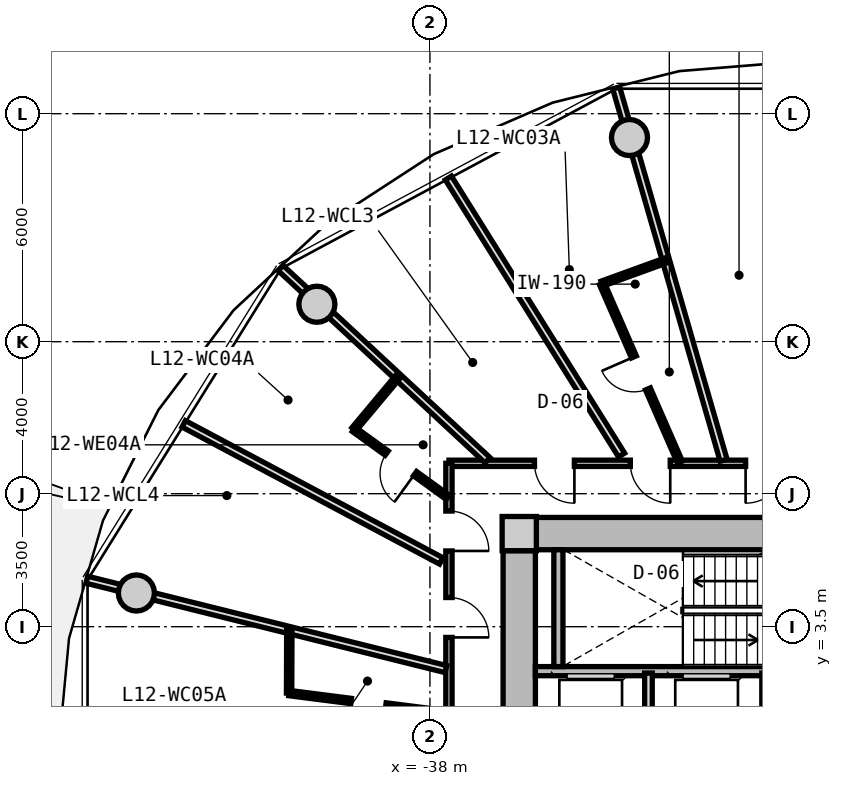
"""IFC4 building model, lengths in metres.
Left out: names, types, materials, properties, quantities, classifications, styles, units other than length and angle.
Written with IfcOpenShell. Run it as: python <this file> out.ifc"""

import sys

from ifc_helpers import new_model, si_unit, direction, frame, frame_2d, origin, origin_2d, place, context, subcontext, project, spatial, rectangle, circle, extrude, source, transform, mapped, element, fill, save


model = new_model("IFC4")
c1 = context("Model", 3, precision=1e-05, world=origin(), true_north=direction((0.0, 1.0)))
c2 = subcontext(c1, "Body", "Model", "MODEL_VIEW")
j1 = project(units=[si_unit("LENGTHUNIT", "METRE"), si_unit("PLANEANGLEUNIT", "RADIAN")], contexts=[c1])
p1 = place(None, origin())
s1 = spatial("IfcSite", under=j1, at=p1, CompositionType="ELEMENT")
p2 = place(p1, origin())
s2 = spatial("IfcBuilding", under=s1, at=p2, CompositionType="ELEMENT")
p3 = place(p2, frame((0.0, 0.0, 42.95)))
s3 = spatial("IfcBuildingStorey", under=s2, at=p3, CompositionType="ELEMENT", Elevation=42.95)
m1 = source(origin(), c2, "Body", "SweptSolid", [
    extrude(rectangle(XDim=0.9, YDim=0.9, at=origin_2d()), origin(), (0.0, 0.0, 1.0), 3.05),
])
p4 = place(p3, frame((-35.65, 5.95, 0.0), z_axis=(0.0, 0.0, 1.0), x_axis=(1.0, 0.0, 0.0)))
e1 = element("IfcColumn", 1, at=p4, inside=s3, PredefinedType="COLUMN", context=c2, shape_type="MappedRepresentation", body=[
    mapped(m1, transform((0.0, 0.0, 0.0), x_axis=(1.0, 0.0, 0.0), y_axis=(0.0, 1.0, 0.0), z_axis=(0.0, 0.0, 1.0), scale=1.0)),
])
m2 = source(origin(), c2, "Body", "SweptSolid", [
    extrude(rectangle(XDim=14.4, YDim=0.85, at=frame_2d((7.2, 0.0))), origin(), (0.0, 0.0, 1.0), 2.79),
])
p5 = place(p3, frame((-35.2, 5.95, 0.0), z_axis=(0.0, 0.0, 1.0), x_axis=(1.0, 0.0, 0.0)))
e2 = element("IfcWall", 2, at=p5, inside=s3, PredefinedType="SHEAR", context=c2, shape_type="MappedRepresentation", body=[
    mapped(m2, transform((0.0, 0.0, 0.0), x_axis=(1.0, 0.0, 0.0), y_axis=(0.0, 1.0, 0.0), z_axis=(0.0, 0.0, 1.0), scale=1.0)),
])
m3 = source(origin(), c2, "Body", "SweptSolid", [
    extrude(rectangle(XDim=11.0, YDim=0.85, at=frame_2d((5.5, 0.0))), origin(), (0.0, 0.0, 1.0), 2.79),
])
p6 = place(p3, frame((-35.65, -5.5, 0.0), z_axis=(0.0, 0.0, 1.0), x_axis=(0.0, 1.0, 0.0)))
e3 = element("IfcWall", 3, at=p6, inside=s3, PredefinedType="SHEAR", context=c2, shape_type="MappedRepresentation", body=[
    mapped(m3, transform((0.0, 0.0, 0.0), x_axis=(1.0, 0.0, 0.0), y_axis=(0.0, 1.0, 0.0), z_axis=(0.0, 0.0, 1.0), scale=1.0)),
])
p7 = place(p6, frame((3.8, 0.0, 0.0)))
e4 = element("IfcOpeningElement", 4, at=p7, cuts=e3, PredefinedType="OPENING", context=c2, shape_type="SweptSolid", body=[
    extrude(rectangle(XDim=1.2, YDim=2.15, at=frame_2d((0.6, 1.075))), frame((0.0, 0.435, 0.0), z_axis=(0.0, -1.0, 0.0), x_axis=(1.0, 0.0, 0.0)), (0.0, 0.0, 1.0), 0.87),
])
m4 = source(origin(), c2, "Body", "SweptSolid", [
    extrude(circle(Radius=0.475, at=origin_2d()), origin(), (0.0, 0.0, 1.0), 3.05),
])
for number, where, z_axis, x_axis in (
    (5, (-32.749, 16.373, 0.0), (0.0, 0.0, 1.0), (1.0, 0.0, 0.0)),
    (6, (-40.975, 11.985, 0.0), (0.0, 0.0, 1.0), (1.0, 0.0, 0.0)),
    (7, (-45.725, 4.387, 0.0), (0.0, 0.0, 1.0), (1.0, 0.0, 0.0)),
):
    element("IfcColumn", number, at=place(p3, frame(where, z_axis=z_axis, x_axis=x_axis)), inside=s3, PredefinedType="COLUMN", context=c2, shape_type="MappedRepresentation", body=[
        mapped(m4, transform((0.0, 0.0, 0.0), x_axis=(1.0, 0.0, 0.0), y_axis=(0.0, 1.0, 0.0), z_axis=(0.0, 0.0, 1.0), scale=1.0)),
    ])
m5 = source(origin(), c2, "Body", "SweptSolid", [
    extrude(rectangle(XDim=7.765, YDim=0.24, at=frame_2d((3.883, 0.0))), origin(), (0.0, 0.0, 1.0), 2.79),
])
p8 = place(p3, frame((-35.225, 2.33, 0.0), z_axis=(0.0, 0.0, 1.0), x_axis=(1.0, 0.0, 0.0)))
e8 = element("IfcWall", 8, at=p8, inside=s3, PredefinedType="PARTITIONING", context=c2, shape_type="MappedRepresentation", body=[
    mapped(m5, transform((0.0, 0.0, 0.0), x_axis=(1.0, 0.0, 0.0), y_axis=(0.0, 1.0, 0.0), z_axis=(0.0, 0.0, 1.0), scale=1.0)),
])
m6 = source(origin(), c2, "Body", "SweptSolid", [
    extrude(rectangle(XDim=3.075, YDim=0.24, at=frame_2d((1.538, 0.0))), origin(), (0.0, 0.0, 1.0), 2.79),
])
p9 = place(p3, frame((-34.62, 2.45, 0.0), z_axis=(0.0, 0.0, 1.0), x_axis=(0.0, 1.0, 0.0)))
e9 = element("IfcWall", 9, at=p9, inside=s3, PredefinedType="PARTITIONING", context=c2, shape_type="MappedRepresentation", body=[
    mapped(m6, transform((0.0, 0.0, 0.0), x_axis=(1.0, 0.0, 0.0), y_axis=(0.0, 1.0, 0.0), z_axis=(0.0, 0.0, 1.0), scale=1.0)),
])
m7 = source(origin(), c2, "Body", "SweptSolid", [
    extrude(rectangle(XDim=2.33, YDim=0.2, at=frame_2d((1.165, 0.0))), origin(), (0.0, 0.0, 1.0), 2.775),
])
p10 = place(p3, frame((-32.25, -0.05, 0.0), z_axis=(0.0, 0.0, 1.0), x_axis=(0.0, 1.0, 0.0)))
e10 = element("IfcWall", 10, at=p10, inside=s3, PredefinedType="PARTITIONING", context=c2, shape_type="MappedRepresentation", body=[
    mapped(m7, transform((0.0, 0.0, 0.0), x_axis=(1.0, 0.0, 0.0), y_axis=(0.0, 1.0, 0.0), z_axis=(0.0, 0.0, 1.0), scale=1.0)),
])
m8 = source(origin(), c2, "Body", "SweptSolid", [
    extrude(rectangle(XDim=19.0, YDim=0.165, at=frame_2d((9.5, 0.0))), origin(), (0.0, 0.0, 1.0), 2.775),
])
p11 = place(p3, frame((-37.5, 7.8, 0.0), z_axis=(0.0, 0.0, 1.0), x_axis=(1.0, 0.0, 0.0)))
e11 = element("IfcWall", 11, at=p11, inside=s3, PredefinedType="PARTITIONING", context=c2, shape_type="MappedRepresentation", body=[
    mapped(m8, transform((0.0, 0.0, 0.0), x_axis=(1.0, 0.0, 0.0), y_axis=(0.0, 1.0, 0.0), z_axis=(0.0, 0.0, 1.0), scale=1.0)),
])
p12 = place(p11, frame((4.773, 0.0, 0.0)))
e12 = element("IfcOpeningElement", 12, at=p12, cuts=e11, PredefinedType="OPENING", context=c2, shape_type="SweptSolid", body=[
    extrude(rectangle(XDim=1.05, YDim=2.15, at=frame_2d((0.525, 1.075))), frame((0.0, 0.093, 0.0), z_axis=(0.0, -1.0, 0.0), x_axis=(1.0, 0.0, 0.0)), (0.0, 0.0, 1.0), 0.185),
])
p13 = place(p11, frame((2.251, 0.0, 0.0)))
e13 = element("IfcOpeningElement", 13, at=p13, cuts=e11, PredefinedType="OPENING", context=c2, shape_type="SweptSolid", body=[
    extrude(rectangle(XDim=1.05, YDim=2.15, at=frame_2d((0.525, 1.075))), frame((0.0, 0.093, 0.0), z_axis=(0.0, -1.0, 0.0), x_axis=(1.0, 0.0, 0.0)), (0.0, 0.0, 1.0), 0.185),
])
p14 = place(p11, frame((14.653, 0.0, 0.0)))
e14 = element("IfcOpeningElement", 14, at=p14, cuts=e11, PredefinedType="OPENING", context=c2, shape_type="SweptSolid", body=[
    extrude(rectangle(XDim=1.05, YDim=2.15, at=frame_2d((0.525, 1.075))), frame((0.0, 0.093, 0.0), z_axis=(0.0, -1.0, 0.0), x_axis=(1.0, 0.0, 0.0)), (0.0, 0.0, 1.0), 0.185),
])
p15 = place(p11, frame((12.5, 0.0, 0.0)))
e15 = element("IfcOpeningElement", 15, at=p15, cuts=e11, PredefinedType="OPENING", context=c2, shape_type="SweptSolid", body=[
    extrude(rectangle(XDim=1.05, YDim=2.15, at=frame_2d((0.525, 1.075))), frame((0.0, 0.093, 0.0), z_axis=(0.0, -1.0, 0.0), x_axis=(1.0, 0.0, 0.0)), (0.0, 0.0, 1.0), 0.185),
])
p16 = place(p11, frame((9.352, 0.0, 0.0)))
e16 = element("IfcOpeningElement", 16, at=p16, cuts=e11, PredefinedType="OPENING", context=c2, shape_type="SweptSolid", body=[
    extrude(rectangle(XDim=1.05, YDim=2.15, at=frame_2d((0.525, 1.075))), frame((0.0, 0.093, 0.0), z_axis=(0.0, -1.0, 0.0), x_axis=(1.0, 0.0, 0.0)), (0.0, 0.0, 1.0), 0.185),
])
p17 = place(p11, frame((7.806, 0.0, 0.0)))
e17 = element("IfcOpeningElement", 17, at=p17, cuts=e11, PredefinedType="OPENING", context=c2, shape_type="SweptSolid", body=[
    extrude(rectangle(XDim=1.05, YDim=2.15, at=frame_2d((0.525, 1.075))), frame((0.0, 0.093, 0.0), z_axis=(0.0, -1.0, 0.0), x_axis=(1.0, 0.0, 0.0)), (0.0, 0.0, 1.0), 0.185),
])
m9 = source(origin(), c2, "Body", "SweptSolid", [
    extrude(rectangle(XDim=15.6, YDim=0.165, at=frame_2d((7.8, 0.0))), origin(), (0.0, 0.0, 1.0), 2.775),
])
p18 = place(p3, frame((-37.5, -7.8, 0.0), z_axis=(0.0, 0.0, 1.0), x_axis=(0.0, 1.0, 0.0)))
e18 = element("IfcWall", 18, at=p18, inside=s3, PredefinedType="PARTITIONING", context=c2, shape_type="MappedRepresentation", body=[
    mapped(m9, transform((0.0, 0.0, 0.0), x_axis=(1.0, 0.0, 0.0), y_axis=(0.0, 1.0, 0.0), z_axis=(0.0, 0.0, 1.0), scale=1.0)),
])
p19 = place(p18, frame((13.293, 0.0, 0.0)))
e19 = element("IfcOpeningElement", 19, at=p19, cuts=e18, PredefinedType="OPENING", context=c2, shape_type="SweptSolid", body=[
    extrude(rectangle(XDim=1.05, YDim=2.15, at=frame_2d((0.525, 1.075))), frame((0.0, 0.093, 0.0), z_axis=(0.0, -1.0, 0.0), x_axis=(1.0, 0.0, 0.0)), (0.0, 0.0, 1.0), 0.185),
])
p20 = place(p18, frame((11.018, 0.0, 0.0)))
e20 = element("IfcOpeningElement", 20, at=p20, cuts=e18, PredefinedType="OPENING", context=c2, shape_type="SweptSolid", body=[
    extrude(rectangle(XDim=1.05, YDim=2.15, at=frame_2d((0.525, 1.075))), frame((0.0, 0.093, 0.0), z_axis=(0.0, -1.0, 0.0), x_axis=(1.0, 0.0, 0.0)), (0.0, 0.0, 1.0), 0.185),
])
p21 = place(p18, frame((7.812, 0.0, 0.0)))
e21 = element("IfcOpeningElement", 21, at=p21, cuts=e18, PredefinedType="OPENING", context=c2, shape_type="SweptSolid", body=[
    extrude(rectangle(XDim=1.05, YDim=2.15, at=frame_2d((0.525, 1.075))), frame((0.0, 0.093, 0.0), z_axis=(0.0, -1.0, 0.0), x_axis=(1.0, 0.0, 0.0)), (0.0, 0.0, 1.0), 0.185),
])
p22 = place(p18, frame((6.035, 0.0, 0.0)))
e22 = element("IfcOpeningElement", 22, at=p22, cuts=e18, PredefinedType="OPENING", context=c2, shape_type="SweptSolid", body=[
    extrude(rectangle(XDim=1.05, YDim=2.15, at=frame_2d((0.525, 1.075))), frame((0.0, 0.093, 0.0), z_axis=(0.0, -1.0, 0.0), x_axis=(1.0, 0.0, 0.0)), (0.0, 0.0, 1.0), 0.185),
])
p23 = place(p18, frame((3.489, 0.0, 0.0)))
e23 = element("IfcOpeningElement", 23, at=p23, cuts=e18, PredefinedType="OPENING", context=c2, shape_type="SweptSolid", body=[
    extrude(rectangle(XDim=1.05, YDim=2.15, at=frame_2d((0.525, 1.075))), frame((0.0, 0.093, 0.0), z_axis=(0.0, -1.0, 0.0), x_axis=(1.0, 0.0, 0.0)), (0.0, 0.0, 1.0), 0.185),
])
p24 = place(p18, frame((0.882, 0.0, 0.0)))
e24 = element("IfcOpeningElement", 24, at=p24, cuts=e18, PredefinedType="OPENING", context=c2, shape_type="SweptSolid", body=[
    extrude(rectangle(XDim=1.05, YDim=2.15, at=frame_2d((0.525, 1.075))), frame((0.0, 0.093, 0.0), z_axis=(0.0, -1.0, 0.0), x_axis=(1.0, 0.0, 0.0)), (0.0, 0.0, 1.0), 0.185),
])
m10 = source(origin(), c2, "Body", "SweptSolid", [
    extrude(rectangle(XDim=10.196, YDim=0.19, at=frame_2d((5.098, 0.0))), origin(), (0.0, 0.0, 1.0), 2.225),
])
p25 = place(p3, frame((-30.273, 7.88, 0.0), z_axis=(0.0, 0.0, 1.0), x_axis=(-0.277136420347, 0.960830580549, 0.0)))
e25 = element("IfcWall", 25, at=p25, inside=s3, PredefinedType="PARTITIONING", context=c2, shape_type="MappedRepresentation", body=[
    mapped(m10, transform((0.0, 0.0, 0.0), x_axis=(1.0, 0.0, 0.0), y_axis=(0.0, 1.0, 0.0), z_axis=(0.0, 0.0, 1.0), scale=1.0)),
])
m11 = source(origin(), c2, "Body", "SweptSolid", [
    extrude(rectangle(XDim=7.435, YDim=0.19, at=frame_2d((3.717, 0.0))), origin(), (0.0, 0.0, 1.0), 2.225),
])
p26 = place(p3, frame((-36.483, 7.88, 0.0), z_axis=(0.0, 0.0, 1.0), x_axis=(-0.732651956848, 0.680603489652, 0.0)))
e26 = element("IfcWall", 26, at=p26, inside=s3, PredefinedType="PARTITIONING", context=c2, shape_type="MappedRepresentation", body=[
    mapped(m11, transform((0.0, 0.0, 0.0), x_axis=(1.0, 0.0, 0.0), y_axis=(0.0, 1.0, 0.0), z_axis=(0.0, 0.0, 1.0), scale=1.0)),
])
m12 = source(origin(), c2, "Body", "SweptSolid", [
    extrude(rectangle(XDim=8.598, YDim=0.19, at=frame_2d((4.299, 0.0))), origin(), (0.0, 0.0, 1.0), 2.775),
])
p27 = place(p3, frame((-32.957, 8.017, 0.0), z_axis=(0.0, 0.0, 1.0), x_axis=(-0.530039776395, 0.847972779893, 0.0)))
e27 = element("IfcWall", 27, at=p27, inside=s3, PredefinedType="PARTITIONING", context=c2, shape_type="MappedRepresentation", body=[
    mapped(m12, transform((0.0, 0.0, 0.0), x_axis=(1.0, 0.0, 0.0), y_axis=(0.0, 1.0, 0.0), z_axis=(0.0, 0.0, 1.0), scale=1.0)),
])
m13 = source(origin(), c2, "Body", "SweptSolid", [
    extrude(rectangle(XDim=5.126, YDim=0.14, at=frame_2d((2.563, 0.0))), origin(), (0.0, 0.0, 1.0), 2.775),
])
p28 = place(p3, frame((-31.422, 7.83, 0.0), z_axis=(0.0, 0.0, 1.0), x_axis=(-0.400473994842, 0.916308124735, 0.0)))
e28 = element("IfcWall", 28, at=p28, inside=s3, PredefinedType="PARTITIONING", context=c2, shape_type="MappedRepresentation", body=[
    mapped(m13, transform((0.0, 0.0, 0.0), x_axis=(1.0, 0.0, 0.0), y_axis=(0.0, 1.0, 0.0), z_axis=(0.0, 0.0, 1.0), scale=1.0)),
])
p29 = place(p28, frame((2.103, 0.0, 0.0)))
e29 = element("IfcOpeningElement", 29, at=p29, cuts=e28, PredefinedType="OPENING", context=c2, shape_type="SweptSolid", body=[
    extrude(rectangle(XDim=0.92, YDim=2.1, at=frame_2d((0.46, 1.05))), frame((0.0, 0.08, 0.0), z_axis=(0.0, -1.0, 0.0), x_axis=(1.0, 0.0, 0.0)), (0.0, 0.0, 1.0), 0.16),
])
m14 = source(origin(), c2, "Body", "SweptSolid", [
    extrude(rectangle(XDim=1.811, YDim=0.14, at=frame_2d((0.906, 0.0))), origin(), (0.0, 0.0, 1.0), 2.775),
])
p30 = place(p3, frame((-33.475, 12.527, 0.0), z_axis=(0.0, 0.0, 1.0), x_axis=(0.940009682452, 0.341147764021, 0.0)))
e30 = element("IfcWall", 30, at=p30, inside=s3, PredefinedType="PARTITIONING", context=c2, shape_type="MappedRepresentation", body=[
    mapped(m14, transform((0.0, 0.0, 0.0), x_axis=(1.0, 0.0, 0.0), y_axis=(0.0, 1.0, 0.0), z_axis=(0.0, 0.0, 1.0), scale=1.0)),
])
m15 = source(origin(), c2, "Body", "SweptSolid", [
    extrude(rectangle(XDim=9.737, YDim=0.19, at=frame_2d((4.869, 0.0))), origin(), (0.0, 0.0, 1.0), 2.225),
])
p31 = place(p3, frame((-37.58, 2.385, 0.0), z_axis=(0.0, 0.0, 1.0), x_axis=(-0.970392716238, 0.241532557375, 0.0)))
e31 = element("IfcWall", 31, at=p31, inside=s3, PredefinedType="PARTITIONING", context=c2, shape_type="MappedRepresentation", body=[
    mapped(m15, transform((0.0, 0.0, 0.0), x_axis=(1.0, 0.0, 0.0), y_axis=(0.0, 1.0, 0.0), z_axis=(0.0, 0.0, 1.0), scale=1.0)),
])
m16 = source(origin(), c2, "Body", "SweptSolid", [
    extrude(rectangle(XDim=7.677, YDim=0.19, at=frame_2d((3.838, 0.0))), origin(), (0.0, 0.0, 1.0), 2.775),
])
p32 = place(p3, frame((-37.703, 5.231, 0.0), z_axis=(0.0, 0.0, 1.0), x_axis=(-0.882725057546, 0.469889851753, 0.0)))
e32 = element("IfcWall", 32, at=p32, inside=s3, PredefinedType="PARTITIONING", context=c2, shape_type="MappedRepresentation", body=[
    mapped(m16, transform((0.0, 0.0, 0.0), x_axis=(1.0, 0.0, 0.0), y_axis=(0.0, 1.0, 0.0), z_axis=(0.0, 0.0, 1.0), scale=1.0)),
])
m17 = source(origin(), c2, "Body", "SweptSolid", [
    extrude(rectangle(XDim=3.051, YDim=0.14, at=frame_2d((1.525, 0.0))), origin(), (0.0, 0.0, 1.0), 2.775),
])
p33 = place(p3, frame((-37.53, 6.903, 0.0), z_axis=(0.0, 0.0, 1.0), x_axis=(-0.809849031404, 0.586638343729, 0.0)))
e33 = element("IfcWall", 33, at=p33, inside=s3, PredefinedType="PARTITIONING", context=c2, shape_type="MappedRepresentation", body=[
    mapped(m17, transform((0.0, 0.0, 0.0), x_axis=(1.0, 0.0, 0.0), y_axis=(0.0, 1.0, 0.0), z_axis=(0.0, 0.0, 1.0), scale=1.0)),
])
p34 = place(p33, frame((1.065, 0.0, 0.0)))
e34 = element("IfcOpeningElement", 34, at=p34, cuts=e33, PredefinedType="OPENING", context=c2, shape_type="SweptSolid", body=[
    extrude(rectangle(XDim=0.92, YDim=2.1, at=frame_2d((0.46, 1.05))), frame((0.0, 0.08, 0.0), z_axis=(0.0, -1.0, 0.0), x_axis=(1.0, 0.0, 0.0)), (0.0, 0.0, 1.0), 0.16),
])
m18 = source(origin(), c2, "Body", "SweptSolid", [
    extrude(rectangle(XDim=1.84, YDim=0.14, at=frame_2d((0.92, 0.0))), origin(), (0.0, 0.0, 1.0), 2.415),
])
p35 = place(p3, frame((-40.0, 8.692, 0.0), z_axis=(0.0, 0.0, 1.0), x_axis=(0.641410397049, 0.767197955262, 0.0)))
e35 = element("IfcWall", 35, at=p35, inside=s3, PredefinedType="PARTITIONING", context=c2, shape_type="MappedRepresentation", body=[
    mapped(m18, transform((0.0, 0.0, 0.0), x_axis=(1.0, 0.0, 0.0), y_axis=(0.0, 1.0, 0.0), z_axis=(0.0, 0.0, 1.0), scale=1.0)),
])
m19 = source(origin(), c2, "Body", "SweptSolid", [
    extrude(rectangle(XDim=4.21, YDim=0.14, at=frame_2d((2.105, 0.0))), origin(), (0.0, 0.0, 1.0), 2.775),
])
p36 = place(p3, frame((-37.53, 1.219, 0.0), z_axis=(0.0, 0.0, 1.0), x_axis=(-0.991917821325, 0.126881975625, 0.0)))
e36 = element("IfcWall", 36, at=p36, inside=s3, PredefinedType="PARTITIONING", context=c2, shape_type="MappedRepresentation", body=[
    mapped(m19, transform((0.0, 0.0, 0.0), x_axis=(1.0, 0.0, 0.0), y_axis=(0.0, 1.0, 0.0), z_axis=(0.0, 0.0, 1.0), scale=1.0)),
])
p37 = place(p36, frame((1.645, 0.0, 0.0)))
e37 = element("IfcOpeningElement", 37, at=p37, cuts=e36, PredefinedType="OPENING", context=c2, shape_type="SweptSolid", body=[
    extrude(rectangle(XDim=0.92, YDim=2.1, at=frame_2d((0.46, 1.05))), frame((0.0, 0.08, 0.0), z_axis=(0.0, -1.0, 0.0), x_axis=(1.0, 0.0, 0.0)), (0.0, 0.0, 1.0), 0.16),
])
m20 = source(origin(), c2, "Body", "SweptSolid", [
    extrude(rectangle(XDim=1.675, YDim=0.14, at=frame_2d((0.837, 0.0))), origin(), (0.0, 0.0, 1.0), 2.775),
])
p38 = place(p3, frame((-41.706, 1.753, 0.0), z_axis=(0.0, 0.0, 1.0), x_axis=(0.003644821977, 0.999993357614, 0.0)))
e38 = element("IfcWall", 38, at=p38, inside=s3, PredefinedType="PARTITIONING", context=c2, shape_type="MappedRepresentation", body=[
    mapped(m20, transform((0.0, 0.0, 0.0), x_axis=(1.0, 0.0, 0.0), y_axis=(0.0, 1.0, 0.0), z_axis=(0.0, 0.0, 1.0), scale=1.0)),
])
m21 = source(origin(), c2, "Body", "SweptSolid", [
    extrude(rectangle(XDim=1.05, YDim=2.15, at=frame_2d((0.525, 1.075))), frame((0.0, 0.025, 0.0), z_axis=(0.0, -1.0, 0.0), x_axis=(1.0, 0.0, 0.0)), (0.0, 0.0, 1.0), 0.05),
])
p39 = place(p12, frame((1.05, 0.0, 0.0), z_axis=(0.0, 0.0, 1.0), x_axis=(-1.0, 0.0, 0.0)))
e39 = element("IfcDoor", 39, at=p39, inside=s3, OperationType="SINGLE_SWING_LEFT", PredefinedType="DOOR", context=c2, shape_type="MappedRepresentation", body=[
    mapped(m21, transform((0.0, 0.0, 0.0), x_axis=(1.0, 0.0, 0.0), y_axis=(0.0, 1.0, 0.0), z_axis=(0.0, 0.0, 1.0), scale=1.0)),
])
fill(e12, e39)
m22 = source(origin(), c2, "Body", "SweptSolid", [
    extrude(rectangle(XDim=0.92, YDim=2.1, at=frame_2d((0.46, 1.05))), frame((0.0, 0.025, 0.0), z_axis=(0.0, -1.0, 0.0), x_axis=(1.0, 0.0, 0.0)), (0.0, 0.0, 1.0), 0.05),
])
p40 = place(p29, origin())
e40 = element("IfcDoor", 40, at=p40, inside=s3, OperationType="SINGLE_SWING_RIGHT", PredefinedType="DOOR", context=c2, shape_type="MappedRepresentation", body=[
    mapped(m22, transform((0.0, 0.0, 0.0), x_axis=(1.0, 0.0, 0.0), y_axis=(0.0, 1.0, 0.0), z_axis=(0.0, 0.0, 1.0), scale=1.0)),
])
fill(e29, e40)
p41 = place(p13, frame((1.05, 0.0, 0.0), z_axis=(0.0, 0.0, 1.0), x_axis=(-1.0, 0.0, 0.0)))
e41 = element("IfcDoor", 41, at=p41, inside=s3, OperationType="SINGLE_SWING_LEFT", PredefinedType="DOOR", context=c2, shape_type="MappedRepresentation", body=[
    mapped(m21, transform((0.0, 0.0, 0.0), x_axis=(1.0, 0.0, 0.0), y_axis=(0.0, 1.0, 0.0), z_axis=(0.0, 0.0, 1.0), scale=1.0)),
])
fill(e13, e41)
p42 = place(p19, frame((1.05, 0.0, 0.0), z_axis=(0.0, 0.0, 1.0), x_axis=(-1.0, 0.0, 0.0)))
e42 = element("IfcDoor", 42, at=p42, inside=s3, OperationType="SINGLE_SWING_RIGHT", PredefinedType="DOOR", context=c2, shape_type="MappedRepresentation", body=[
    mapped(m21, transform((0.0, 0.0, 0.0), x_axis=(1.0, 0.0, 0.0), y_axis=(0.0, 1.0, 0.0), z_axis=(0.0, 0.0, 1.0), scale=1.0)),
])
fill(e19, e42)
p43 = place(p34, origin())
e43 = element("IfcDoor", 43, at=p43, inside=s3, OperationType="SINGLE_SWING_LEFT", PredefinedType="DOOR", context=c2, shape_type="MappedRepresentation", body=[
    mapped(m22, transform((0.0, 0.0, 0.0), x_axis=(1.0, 0.0, 0.0), y_axis=(0.0, 1.0, 0.0), z_axis=(0.0, 0.0, 1.0), scale=1.0)),
])
fill(e34, e43)
p44 = place(p20, frame((1.05, 0.0, 0.0), z_axis=(0.0, 0.0, 1.0), x_axis=(-1.0, 0.0, 0.0)))
e44 = element("IfcDoor", 44, at=p44, inside=s3, OperationType="SINGLE_SWING_RIGHT", PredefinedType="DOOR", context=c2, shape_type="MappedRepresentation", body=[
    mapped(m21, transform((0.0, 0.0, 0.0), x_axis=(1.0, 0.0, 0.0), y_axis=(0.0, 1.0, 0.0), z_axis=(0.0, 0.0, 1.0), scale=1.0)),
])
fill(e20, e44)
p45 = place(p37, origin())
e45 = element("IfcDoor", 45, at=p45, inside=s3, OperationType="SINGLE_SWING_RIGHT", PredefinedType="DOOR", context=c2, shape_type="MappedRepresentation", body=[
    mapped(m22, transform((0.0, 0.0, 0.0), x_axis=(1.0, 0.0, 0.0), y_axis=(0.0, 1.0, 0.0), z_axis=(0.0, 0.0, 1.0), scale=1.0)),
])
fill(e37, e45)
p46 = place(p17, frame((1.05, 0.0, 0.0), z_axis=(0.0, 0.0, 1.0), x_axis=(-1.0, 0.0, 0.0)))
e46 = element("IfcDoor", 46, at=p46, inside=s3, OperationType="SINGLE_SWING_RIGHT", PredefinedType="DOOR", context=c2, shape_type="MappedRepresentation", body=[
    mapped(m21, transform((0.0, 0.0, 0.0), x_axis=(1.0, 0.0, 0.0), y_axis=(0.0, 1.0, 0.0), z_axis=(0.0, 0.0, 1.0), scale=1.0)),
])
fill(e17, e46)
save(model, sys.argv[1])
